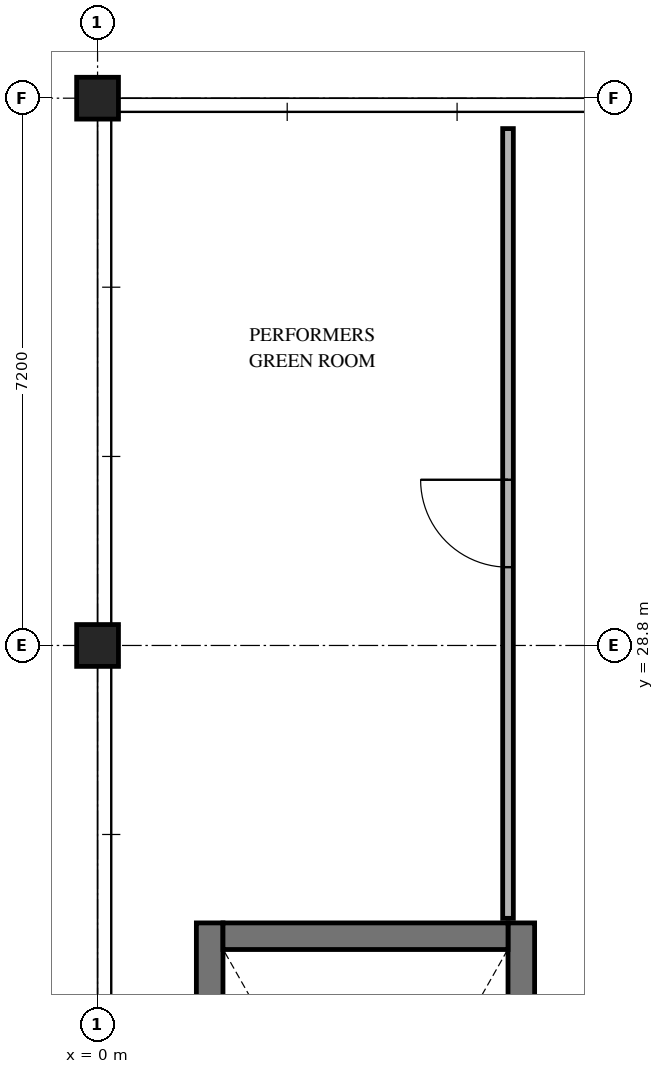
"""IFC4 building model, lengths in metres.
Left out: names, types, materials, properties, quantities, classifications, styles, units other than length and angle.
Written with IfcOpenShell. Run it as: python <this file> out.ifc"""

import sys

from ifc_helpers import new_model, si_unit, direction, frame, frame_2d, origin, origin_2d, place, context, subcontext, project, spatial, rectangle, extrude, element, fill, save


model = new_model("IFC4")
c1 = context("Model", 3, precision=1e-05, world=origin(), true_north=direction((0.0, 1.0)))
c2 = subcontext(c1, "Body", "Model", "MODEL_VIEW")
j1 = project(units=[si_unit("LENGTHUNIT", "METRE"), si_unit("PLANEANGLEUNIT", "RADIAN")], contexts=[c1])
p1 = place(None, origin())
s1 = spatial("IfcSite", under=j1, at=p1, CompositionType="ELEMENT")
p2 = place(p1, origin())
s2 = spatial("IfcBuilding", under=s1, at=p2, CompositionType="ELEMENT")
p3 = place(p2, frame((0.0, 0.0, 4.5)))
s3 = spatial("IfcBuildingStorey", under=s2, at=p3, CompositionType="ELEMENT", Elevation=4.5)
for number, where, z_axis, x_axis in (
    (1, (0.0, 28.8, 0.0), (0.0, 0.0, 1.0), (1.0, 0.0, 0.0)),
    (2, (0.0, 36.0, 0.0), (0.0, 0.0, 1.0), (1.0, 0.0, 0.0)),
):
    element("IfcColumn", number, at=place(p3, frame(where, z_axis=z_axis, x_axis=x_axis)), inside=s3, PredefinedType="COLUMN", context=c2, shape_type="SweptSolid", body=[
        extrude(rectangle(XDim=0.55, YDim=0.55, at=origin_2d()), origin(), (0.0, 0.0, 1.0), 4.2),
    ])
for number, where, z_axis, x_axis in (
    (3, (5.575, 16.05, 0.0), (0.0, 0.0, 1.0), (0.0, 1.0, 0.0)),
    (4, (1.475, 25.15, 0.0), (0.0, 0.0, 1.0), (0.0, -1.0, 0.0)),
):
    element("IfcWall", number, at=place(p3, frame(where, z_axis=z_axis, x_axis=x_axis)), inside=s3, PredefinedType="SHEAR", context=c2, shape_type="SweptSolid", body=[
        extrude(rectangle(XDim=9.1, YDim=0.35, at=frame_2d((4.55, 0.0))), origin(), (0.0, 0.0, 1.0), 3.95),
    ])
p4 = place(p3, frame((5.4, 24.975, 0.0), z_axis=(0.0, 0.0, 1.0), x_axis=(-1.0, 0.0, 0.0)))
e5 = element("IfcWall", 5, at=p4, inside=s3, PredefinedType="SHEAR", context=c2, shape_type="SweptSolid", body=[
    extrude(rectangle(XDim=3.75, YDim=0.35, at=frame_2d((1.875, 0.0))), origin(), (0.0, 0.0, 1.0), 3.95),
])
p5 = place(p3, frame((5.4, 25.21, 0.0), z_axis=(0.0, 0.0, 1.0), x_axis=(0.0, 1.0, 0.0)))
e6 = element("IfcWall", 6, at=p5, inside=s3, PredefinedType="PARTITIONING", context=c2, shape_type="SweptSolid", body=[
    extrude(rectangle(XDim=10.39, YDim=0.14, at=frame_2d((5.195, 0.0))), origin(), (0.0, 0.0, 1.0), 3.15),
])
p6 = place(p5, frame((4.62, 0.0, 0.0)))
e7 = element("IfcOpeningElement", 7, at=p6, cuts=e6, PredefinedType="OPENING", context=c2, shape_type="SweptSolid", body=[
    extrude(rectangle(XDim=1.15, YDim=2.15, at=frame_2d((0.575, 1.075))), frame((0.0, 0.08, 0.0), z_axis=(0.0, -1.0, 0.0), x_axis=(1.0, 0.0, 0.0)), (0.0, 0.0, 1.0), 0.16),
])
p7 = place(p6, origin())
e8 = element("IfcDoor", 8, at=p7, inside=s3, OperationType="SINGLE_SWING_RIGHT", PredefinedType="DOOR", context=c2, shape_type="SweptSolid", body=[
    extrude(rectangle(XDim=1.15, YDim=2.15, at=frame_2d((0.575, 1.075))), frame((0.0, 0.025, 0.0), z_axis=(0.0, -1.0, 0.0), x_axis=(1.0, 0.0, 0.0)), (0.0, 0.0, 1.0), 0.05),
])
fill(e7, e8)
save(model, sys.argv[1])
